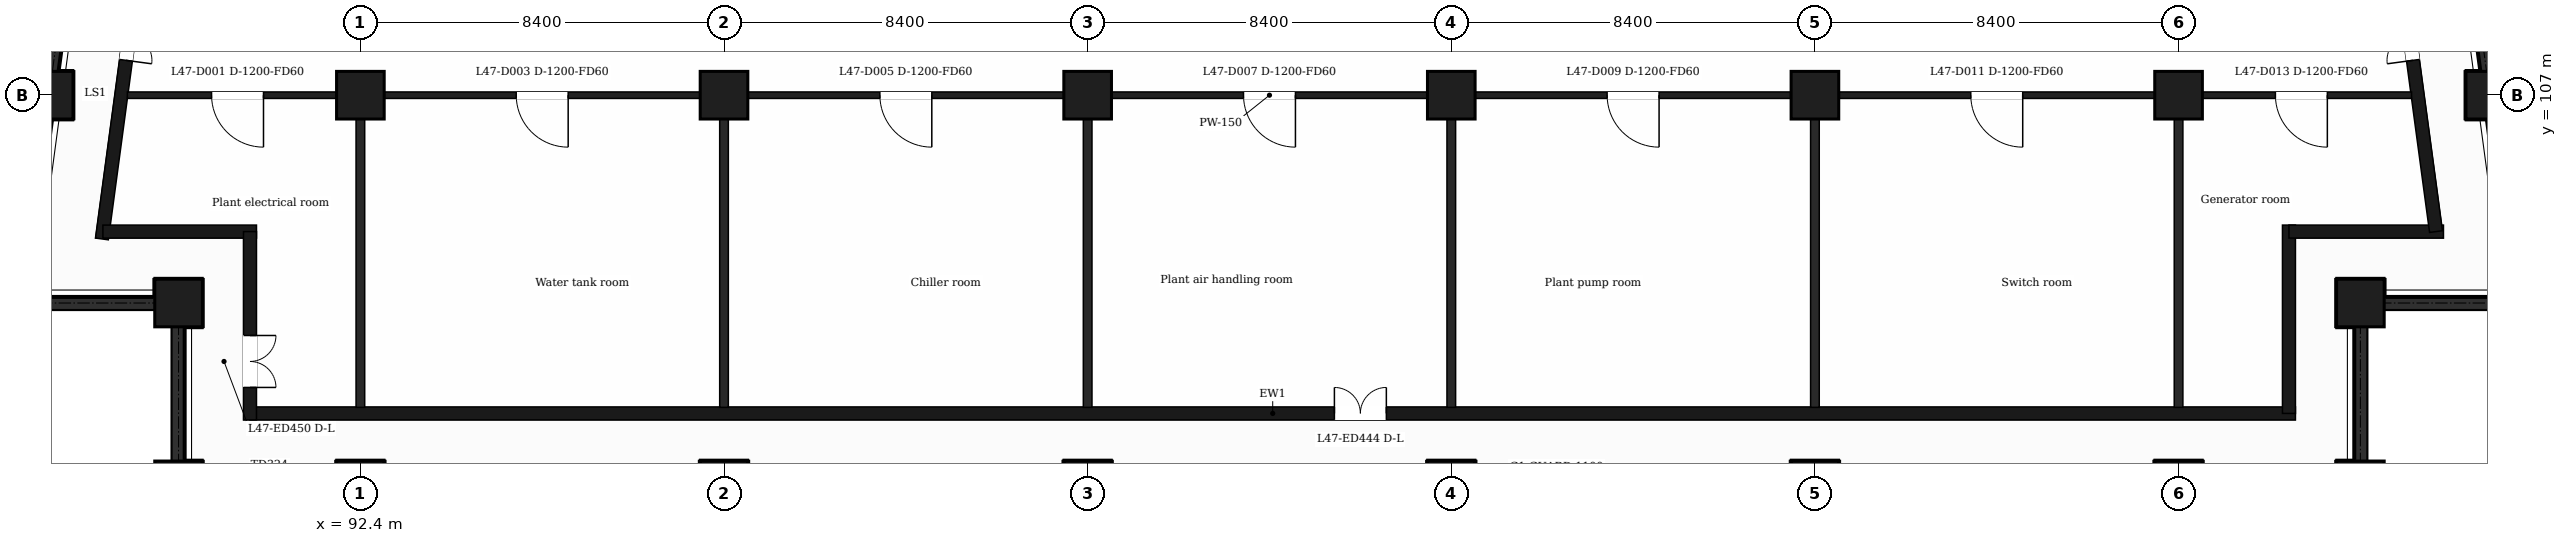
"""IFC4 building model, lengths in metres.
Left out: names, types, materials, properties, quantities, classifications, styles, units other than length and angle.
Written with IfcOpenShell. Run it as: python <this file> out.ifc"""

import sys

from ifc_helpers import new_model, si_unit, direction, frame, frame_2d, origin, origin_2d, place, context, subcontext, project, spatial, rectangle, extrude, element, fill, save


model = new_model("IFC4")
c1 = context("Model", 3, precision=1e-05, world=origin(), true_north=direction((0.0, 1.0)))
c2 = subcontext(c1, "Body", "Model", "MODEL_VIEW")
j1 = project(units=[si_unit("LENGTHUNIT", "METRE"), si_unit("PLANEANGLEUNIT", "RADIAN")], contexts=[c1])
p1 = place(None, origin())
s1 = spatial("IfcSite", under=j1, at=p1, CompositionType="ELEMENT")
p2 = place(p1, origin())
s2 = spatial("IfcBuilding", under=s1, at=p2, CompositionType="ELEMENT")
p3 = place(p2, frame((0.0, 0.0, 197.2)))
s3 = spatial("IfcBuildingStorey", under=s2, at=p3, CompositionType="ELEMENT", Elevation=197.2)
for number, where, z_axis, x_axis in (
    (1, (92.4, 98.0, 0.0), (0.0, 0.0, 1.0), (1.0, 0.0, 0.0)),
    (2, (100.8, 98.0, 0.0), (0.0, 0.0, 1.0), (1.0, 0.0, 0.0)),
    (3, (109.2, 98.0, 0.0), (0.0, 0.0, 1.0), (1.0, 0.0, 0.0)),
    (4, (117.6, 98.0, 0.0), (0.0, 0.0, 1.0), (1.0, 0.0, 0.0)),
    (5, (126.0, 98.0, 0.0), (0.0, 0.0, 1.0), (1.0, 0.0, 0.0)),
    (6, (134.4, 98.0, 0.0), (0.0, 0.0, 1.0), (1.0, 0.0, 0.0)),
    (7, (88.2, 98.0, 0.0), (0.0, 0.0, 1.0), (1.0, 0.0, 0.0)),
    (8, (138.6, 98.0, 0.0), (0.0, 0.0, 1.0), (1.0, 0.0, 0.0)),
    (9, (88.2, 102.2, 0.0), (0.0, 0.0, 1.0), (1.0, 0.0, 0.0)),
    (10, (138.6, 102.2, 0.0), (0.0, 0.0, 1.0), (1.0, 0.0, 0.0)),
    (11, (92.4, 107.0, 0.0), (0.0, 0.0, 1.0), (1.0, 0.0, 0.0)),
    (12, (100.8, 107.0, 0.0), (0.0, 0.0, 1.0), (1.0, 0.0, 0.0)),
    (13, (109.2, 107.0, 0.0), (0.0, 0.0, 1.0), (1.0, 0.0, 0.0)),
    (14, (117.6, 107.0, 0.0), (0.0, 0.0, 1.0), (1.0, 0.0, 0.0)),
    (15, (126.0, 107.0, 0.0), (0.0, 0.0, 1.0), (1.0, 0.0, 0.0)),
    (16, (134.4, 107.0, 0.0), (0.0, 0.0, 1.0), (1.0, 0.0, 0.0)),
    (17, (85.211, 107.0, 0.0), (0.0, 0.0, 1.0), (1.0, 0.0, 0.0)),
    (18, (141.588, 107.0, 0.0), (0.0, 0.0, 1.0), (1.0, 0.0, 0.0)),
):
    element("IfcColumn", number, at=place(p3, frame(where, z_axis=z_axis, x_axis=x_axis)), inside=s3, PredefinedType="COLUMN", context=c2, shape_type="SweptSolid", body=[
        extrude(rectangle(XDim=1.1, YDim=1.1, at=origin_2d()), origin(), (0.0, 0.0, 1.0), 5.0),
    ])
p4 = place(p3, frame((89.85, 99.65, 0.0), z_axis=(0.0, 0.0, 1.0), x_axis=(1.0, 0.0, 0.0)))
e19 = element("IfcWall", 19, at=p4, inside=s3, PredefinedType="SOLIDWALL", context=c2, shape_type="SweptSolid", body=[
    extrude(rectangle(XDim=47.25, YDim=0.3, at=frame_2d((23.625, 0.0))), origin(), (0.0, 0.0, 1.0), 4.68),
])
p5 = place(p4, frame((25.05, 0.0, 0.0)))
e20 = element("IfcOpeningElement", 20, at=p5, cuts=e19, PredefinedType="OPENING", context=c2, shape_type="SweptSolid", body=[
    extrude(rectangle(XDim=1.2, YDim=2.4, at=frame_2d((0.6, 1.2))), frame((0.0, 0.16, 0.0), z_axis=(0.0, -1.0, 0.0), x_axis=(1.0, 0.0, 0.0)), (0.0, 0.0, 1.0), 0.32),
])
p6 = place(p3, frame((136.95, 99.65, 0.0), z_axis=(0.0, 0.0, 1.0), x_axis=(0.0, 1.0, 0.0)))
e21 = element("IfcWall", 21, at=p6, inside=s3, PredefinedType="SOLIDWALL", context=c2, shape_type="SweptSolid", body=[
    extrude(rectangle(XDim=4.35, YDim=0.3, at=frame_2d((2.175, 0.0))), origin(), (0.0, 0.0, 1.0), 4.68),
])
p7 = place(p3, frame((136.95, 103.85, 0.0), z_axis=(0.0, 0.0, 1.0), x_axis=(1.0, 0.0, 0.0)))
e22 = element("IfcWall", 22, at=p7, inside=s3, PredefinedType="SOLIDWALL", context=c2, shape_type="SweptSolid", body=[
    extrude(rectangle(XDim=3.569, YDim=0.3, at=frame_2d((1.785, 0.0))), origin(), (0.0, 0.0, 1.0), 4.68),
])
p8 = place(p3, frame((140.348, 103.85, 0.0), z_axis=(0.0, 0.0, 1.0), x_axis=(-0.133431549479, 0.991058031401, 0.0)))
e23 = element("IfcWall", 23, at=p8, inside=s3, PredefinedType="SOLIDWALL", context=c2, shape_type="SweptSolid", body=[
    extrude(rectangle(XDim=6.609, YDim=0.3, at=frame_2d((3.304, 0.0))), origin(), (0.0, 0.0, 1.0), 4.68),
])
p9 = place(p8, frame((3.991, 0.0, 0.0)))
e24 = element("IfcOpeningElement", 24, at=p9, cuts=e23, PredefinedType="OPENING", context=c2, shape_type="SweptSolid", body=[
    extrude(rectangle(XDim=1.2, YDim=2.4, at=frame_2d((0.6, 1.2))), frame((0.0, 0.16, 0.0), z_axis=(0.0, -1.0, 0.0), x_axis=(1.0, 0.0, 0.0)), (0.0, 0.0, 1.0), 0.32),
])
p10 = place(p3, frame((87.334, 110.4, 0.0), z_axis=(0.0, 0.0, 1.0), x_axis=(-0.133437175554, -0.991057273915, 0.0)))
e25 = element("IfcWall", 25, at=p10, inside=s3, PredefinedType="SOLIDWALL", context=c2, shape_type="SweptSolid", body=[
    extrude(rectangle(XDim=6.781, YDim=0.3, at=frame_2d((3.39, 0.0))), origin(), (0.0, 0.0, 1.0), 4.68),
])
p11 = place(p10, frame((1.418, 0.0, 0.0)))
e26 = element("IfcOpeningElement", 26, at=p11, cuts=e25, PredefinedType="OPENING", context=c2, shape_type="SweptSolid", body=[
    extrude(rectangle(XDim=1.2, YDim=2.4, at=frame_2d((0.6, 1.2))), frame((0.0, 0.16, 0.0), z_axis=(0.0, -1.0, 0.0), x_axis=(1.0, 0.0, 0.0)), (0.0, 0.0, 1.0), 0.32),
])
p12 = place(p3, frame((86.452, 103.85, 0.0), z_axis=(0.0, 0.0, 1.0), x_axis=(1.0, 0.0, 0.0)))
e27 = element("IfcWall", 27, at=p12, inside=s3, PredefinedType="SOLIDWALL", context=c2, shape_type="SweptSolid", body=[
    extrude(rectangle(XDim=3.548, YDim=0.3, at=frame_2d((1.774, 0.0))), origin(), (0.0, 0.0, 1.0), 4.68),
])
p13 = place(p3, frame((89.85, 103.85, 0.0), z_axis=(0.0, 0.0, 1.0), x_axis=(0.0, -1.0, 0.0)))
e28 = element("IfcWall", 28, at=p13, inside=s3, PredefinedType="SOLIDWALL", context=c2, shape_type="SweptSolid", body=[
    extrude(rectangle(XDim=4.35, YDim=0.3, at=frame_2d((2.175, 0.0))), origin(), (0.0, 0.0, 1.0), 4.68),
])
p14 = place(p13, frame((2.4, 0.0, 0.0)))
e29 = element("IfcOpeningElement", 29, at=p14, cuts=e28, PredefinedType="OPENING", context=c2, shape_type="SweptSolid", body=[
    extrude(rectangle(XDim=1.2, YDim=2.4, at=frame_2d((0.6, 1.2))), frame((0.0, 0.16, 0.0), z_axis=(0.0, -1.0, 0.0), x_axis=(1.0, 0.0, 0.0)), (0.0, 0.0, 1.0), 0.32),
])
p15 = place(p3, frame((87.018, 107.0, 0.0), z_axis=(0.0, 0.0, 1.0), x_axis=(1.0, 0.0, 0.0)))
e30 = element("IfcWall", 30, at=p15, inside=s3, PredefinedType="PARTITIONING", context=c2, shape_type="SweptSolid", body=[
    extrude(rectangle(XDim=52.765, YDim=0.15, at=frame_2d((26.382, 0.0))), origin(), (0.0, 0.0, 1.0), 4.68),
])
p16 = place(p15, frame((1.944, 0.0, 0.0)))
e31 = element("IfcOpeningElement", 31, at=p16, cuts=e30, PredefinedType="OPENING", context=c2, shape_type="SweptSolid", body=[
    extrude(rectangle(XDim=1.2, YDim=2.1, at=frame_2d((0.6, 1.05))), frame((0.0, 0.085, 0.0), z_axis=(0.0, -1.0, 0.0), x_axis=(1.0, 0.0, 0.0)), (0.0, 0.0, 1.0), 0.17),
])
p17 = place(p15, frame((8.982, 0.0, 0.0)))
e32 = element("IfcOpeningElement", 32, at=p17, cuts=e30, PredefinedType="OPENING", context=c2, shape_type="SweptSolid", body=[
    extrude(rectangle(XDim=1.2, YDim=2.1, at=frame_2d((0.6, 1.05))), frame((0.0, 0.085, 0.0), z_axis=(0.0, -1.0, 0.0), x_axis=(1.0, 0.0, 0.0)), (0.0, 0.0, 1.0), 0.17),
])
p18 = place(p15, frame((17.382, 0.0, 0.0)))
e33 = element("IfcOpeningElement", 33, at=p18, cuts=e30, PredefinedType="OPENING", context=c2, shape_type="SweptSolid", body=[
    extrude(rectangle(XDim=1.2, YDim=2.1, at=frame_2d((0.6, 1.05))), frame((0.0, 0.085, 0.0), z_axis=(0.0, -1.0, 0.0), x_axis=(1.0, 0.0, 0.0)), (0.0, 0.0, 1.0), 0.17),
])
p19 = place(p15, frame((25.782, 0.0, 0.0)))
e34 = element("IfcOpeningElement", 34, at=p19, cuts=e30, PredefinedType="OPENING", context=c2, shape_type="SweptSolid", body=[
    extrude(rectangle(XDim=1.2, YDim=2.1, at=frame_2d((0.6, 1.05))), frame((0.0, 0.085, 0.0), z_axis=(0.0, -1.0, 0.0), x_axis=(1.0, 0.0, 0.0)), (0.0, 0.0, 1.0), 0.17),
])
p20 = place(p15, frame((34.182, 0.0, 0.0)))
e35 = element("IfcOpeningElement", 35, at=p20, cuts=e30, PredefinedType="OPENING", context=c2, shape_type="SweptSolid", body=[
    extrude(rectangle(XDim=1.2, YDim=2.1, at=frame_2d((0.6, 1.05))), frame((0.0, 0.085, 0.0), z_axis=(0.0, -1.0, 0.0), x_axis=(1.0, 0.0, 0.0)), (0.0, 0.0, 1.0), 0.17),
])
p21 = place(p15, frame((42.582, 0.0, 0.0)))
e36 = element("IfcOpeningElement", 36, at=p21, cuts=e30, PredefinedType="OPENING", context=c2, shape_type="SweptSolid", body=[
    extrude(rectangle(XDim=1.2, YDim=2.1, at=frame_2d((0.6, 1.05))), frame((0.0, 0.085, 0.0), z_axis=(0.0, -1.0, 0.0), x_axis=(1.0, 0.0, 0.0)), (0.0, 0.0, 1.0), 0.17),
])
p22 = place(p15, frame((49.619, 0.0, 0.0)))
e37 = element("IfcOpeningElement", 37, at=p22, cuts=e30, PredefinedType="OPENING", context=c2, shape_type="SweptSolid", body=[
    extrude(rectangle(XDim=1.2, YDim=2.1, at=frame_2d((0.6, 1.05))), frame((0.0, 0.085, 0.0), z_axis=(0.0, -1.0, 0.0), x_axis=(1.0, 0.0, 0.0)), (0.0, 0.0, 1.0), 0.17),
])
for number, where, z_axis, x_axis in (
    (38, (92.4, 99.79, 0.0), (0.0, 0.0, 1.0), (0.0, 1.0, 0.0)),
    (39, (100.8, 99.79, 0.0), (0.0, 0.0, 1.0), (0.0, 1.0, 0.0)),
    (40, (109.2, 99.79, 0.0), (0.0, 0.0, 1.0), (0.0, 1.0, 0.0)),
    (41, (117.6, 99.79, 0.0), (0.0, 0.0, 1.0), (0.0, 1.0, 0.0)),
    (42, (126.0, 99.79, 0.0), (0.0, 0.0, 1.0), (0.0, 1.0, 0.0)),
    (43, (134.4, 99.79, 0.0), (0.0, 0.0, 1.0), (0.0, 1.0, 0.0)),
):
    element("IfcWall", number, at=place(p3, frame(where, z_axis=z_axis, x_axis=x_axis)), inside=s3, PredefinedType="PARTITIONING", context=c2, shape_type="SweptSolid", body=[
        extrude(rectangle(XDim=7.135, YDim=0.2, at=frame_2d((3.567, 0.0))), origin(), (0.0, 0.0, 1.0), 4.68),
    ])
p23 = place(p5, origin())
e44 = element("IfcDoor", 44, at=p23, inside=s3, OperationType="DOUBLE_DOOR_SINGLE_SWING", PredefinedType="DOOR", context=c2, shape_type="SweptSolid", body=[
    extrude(rectangle(XDim=1.2, YDim=2.4, at=frame_2d((0.6, 1.2))), frame((0.0, 0.025, 0.0), z_axis=(0.0, -1.0, 0.0), x_axis=(1.0, 0.0, 0.0)), (0.0, 0.0, 1.0), 0.05),
])
fill(e20, e44)
p24 = place(p9, origin())
e45 = element("IfcDoor", 45, at=p24, inside=s3, OperationType="DOUBLE_DOOR_SINGLE_SWING", PredefinedType="DOOR", context=c2, shape_type="SweptSolid", body=[
    extrude(rectangle(XDim=1.2, YDim=2.4, at=frame_2d((0.6, 1.2))), frame((0.0, 0.025, 0.0), z_axis=(0.0, -1.0, 0.0), x_axis=(1.0, 0.0, 0.0)), (0.0, 0.0, 1.0), 0.05),
])
fill(e24, e45)
p25 = place(p11, origin())
e46 = element("IfcDoor", 46, at=p25, inside=s3, OperationType="DOUBLE_DOOR_SINGLE_SWING", PredefinedType="DOOR", context=c2, shape_type="SweptSolid", body=[
    extrude(rectangle(XDim=1.2, YDim=2.4, at=frame_2d((0.6, 1.2))), frame((0.0, 0.025, 0.0), z_axis=(0.0, -1.0, 0.0), x_axis=(1.0, 0.0, 0.0)), (0.0, 0.0, 1.0), 0.05),
])
fill(e26, e46)
p26 = place(p14, origin())
e47 = element("IfcDoor", 47, at=p26, inside=s3, OperationType="DOUBLE_DOOR_SINGLE_SWING", PredefinedType="DOOR", context=c2, shape_type="SweptSolid", body=[
    extrude(rectangle(XDim=1.2, YDim=2.4, at=frame_2d((0.6, 1.2))), frame((0.0, 0.025, 0.0), z_axis=(0.0, -1.0, 0.0), x_axis=(1.0, 0.0, 0.0)), (0.0, 0.0, 1.0), 0.05),
])
fill(e29, e47)
p27 = place(p16, origin())
e48 = element("IfcDoor", 48, at=p27, inside=s3, OperationType="SINGLE_SWING_RIGHT", PredefinedType="DOOR", context=c2, shape_type="SweptSolid", body=[
    extrude(rectangle(XDim=1.2, YDim=2.1, at=frame_2d((0.6, 1.05))), frame((0.0, 0.025, 0.0), z_axis=(0.0, -1.0, 0.0), x_axis=(1.0, 0.0, 0.0)), (0.0, 0.0, 1.0), 0.05),
])
fill(e31, e48)
p28 = place(p17, origin())
e49 = element("IfcDoor", 49, at=p28, inside=s3, OperationType="SINGLE_SWING_RIGHT", PredefinedType="DOOR", context=c2, shape_type="SweptSolid", body=[
    extrude(rectangle(XDim=1.2, YDim=2.1, at=frame_2d((0.6, 1.05))), frame((0.0, 0.025, 0.0), z_axis=(0.0, -1.0, 0.0), x_axis=(1.0, 0.0, 0.0)), (0.0, 0.0, 1.0), 0.05),
])
fill(e32, e49)
p29 = place(p18, origin())
e50 = element("IfcDoor", 50, at=p29, inside=s3, OperationType="SINGLE_SWING_RIGHT", PredefinedType="DOOR", context=c2, shape_type="SweptSolid", body=[
    extrude(rectangle(XDim=1.2, YDim=2.1, at=frame_2d((0.6, 1.05))), frame((0.0, 0.025, 0.0), z_axis=(0.0, -1.0, 0.0), x_axis=(1.0, 0.0, 0.0)), (0.0, 0.0, 1.0), 0.05),
])
fill(e33, e50)
p30 = place(p19, origin())
e51 = element("IfcDoor", 51, at=p30, inside=s3, OperationType="SINGLE_SWING_RIGHT", PredefinedType="DOOR", context=c2, shape_type="SweptSolid", body=[
    extrude(rectangle(XDim=1.2, YDim=2.1, at=frame_2d((0.6, 1.05))), frame((0.0, 0.025, 0.0), z_axis=(0.0, -1.0, 0.0), x_axis=(1.0, 0.0, 0.0)), (0.0, 0.0, 1.0), 0.05),
])
fill(e34, e51)
p31 = place(p20, origin())
e52 = element("IfcDoor", 52, at=p31, inside=s3, OperationType="SINGLE_SWING_RIGHT", PredefinedType="DOOR", context=c2, shape_type="SweptSolid", body=[
    extrude(rectangle(XDim=1.2, YDim=2.1, at=frame_2d((0.6, 1.05))), frame((0.0, 0.025, 0.0), z_axis=(0.0, -1.0, 0.0), x_axis=(1.0, 0.0, 0.0)), (0.0, 0.0, 1.0), 0.05),
])
fill(e35, e52)
p32 = place(p21, origin())
e53 = element("IfcDoor", 53, at=p32, inside=s3, OperationType="SINGLE_SWING_RIGHT", PredefinedType="DOOR", context=c2, shape_type="SweptSolid", body=[
    extrude(rectangle(XDim=1.2, YDim=2.1, at=frame_2d((0.6, 1.05))), frame((0.0, 0.025, 0.0), z_axis=(0.0, -1.0, 0.0), x_axis=(1.0, 0.0, 0.0)), (0.0, 0.0, 1.0), 0.05),
])
fill(e36, e53)
p33 = place(p22, origin())
e54 = element("IfcDoor", 54, at=p33, inside=s3, OperationType="SINGLE_SWING_RIGHT", PredefinedType="DOOR", context=c2, shape_type="SweptSolid", body=[
    extrude(rectangle(XDim=1.2, YDim=2.1, at=frame_2d((0.6, 1.05))), frame((0.0, 0.025, 0.0), z_axis=(0.0, -1.0, 0.0), x_axis=(1.0, 0.0, 0.0)), (0.0, 0.0, 1.0), 0.05),
])
fill(e37, e54)
save(model, sys.argv[1])
